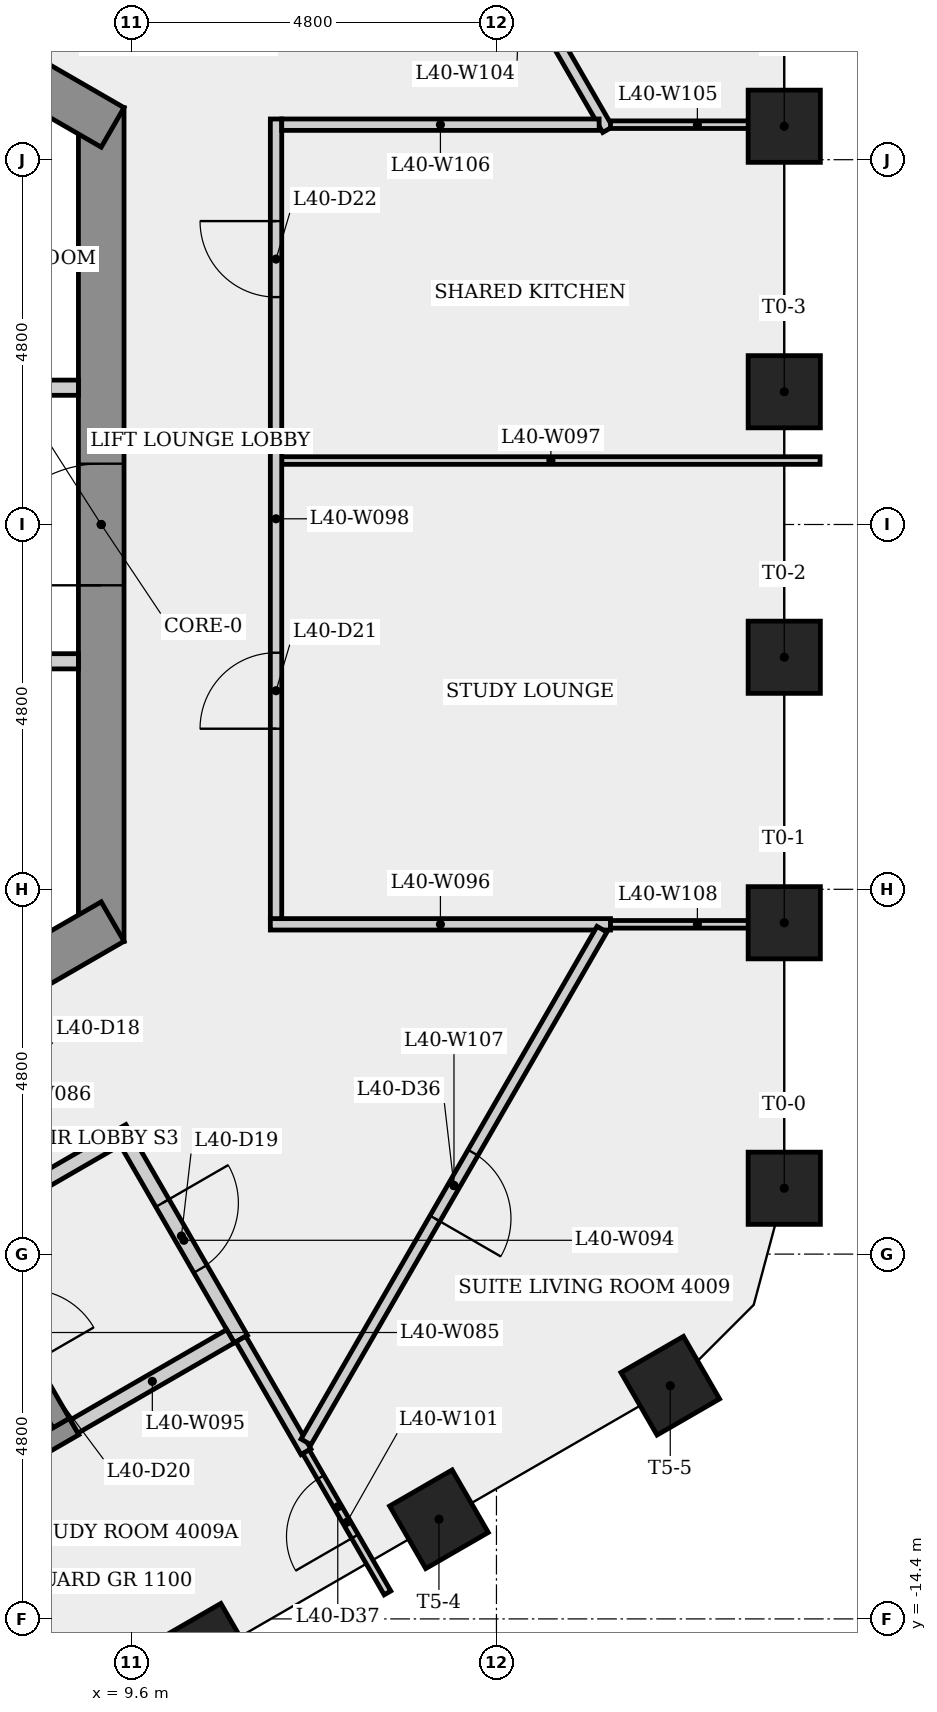
"""IFC4 building model, lengths in metres.
Left out: names, types, materials, properties, quantities, classifications, styles, units other than length and angle.
Written with IfcOpenShell. Run it as: python <this file> out.ifc"""

import sys

from ifc_helpers import new_model, si_unit, direction, frame, frame_2d, origin, origin_2d, place, context, subcontext, project, spatial, rectangle, extrude, element, fill, save


model = new_model("IFC4")
c1 = context("Model", 3, precision=1e-05, world=origin(), true_north=direction((0.0, 1.0)))
c2 = subcontext(c1, "Body", "Model", "MODEL_VIEW")
j1 = project(units=[si_unit("LENGTHUNIT", "METRE"), si_unit("PLANEANGLEUNIT", "RADIAN")], contexts=[c1])
p1 = place(None, origin())
s1 = spatial("IfcSite", under=j1, at=p1, CompositionType="ELEMENT")
p2 = place(p1, origin())
s2 = spatial("IfcBuilding", under=s1, at=p2, CompositionType="ELEMENT")
p3 = place(p2, frame((0.0, 0.0, 152.7)))
s3 = spatial("IfcBuildingStorey", under=s2, at=p3, CompositionType="ELEMENT", Elevation=152.7)
p4 = place(p3, frame((9.2, -5.485, 0.0), z_axis=(0.0, 0.0, 1.0), x_axis=(0.0, 1.0, 0.0)))
e1 = element("IfcWall", 1, at=p4, inside=s3, PredefinedType="SHEAR", context=c2, shape_type="SweptSolid", body=[
    extrude(rectangle(XDim=10.97, YDim=0.6, at=frame_2d((5.485, 0.0))), origin(), (0.0, 0.0, 1.0), 3.4),
])
p5 = place(p4, frame((4.685, 0.0, 0.0)))
e2 = element("IfcOpeningElement", 2, at=p5, cuts=e1, PredefinedType="OPENING", context=c2, shape_type="SweptSolid", body=[
    extrude(rectangle(XDim=1.6, YDim=2.1, at=frame_2d((0.8, 1.05))), frame((0.0, 0.31, 0.0), z_axis=(0.0, -1.0, 0.0), x_axis=(1.0, 0.0, 0.0)), (0.0, 0.0, 1.0), 0.62),
])
p6 = place(p3, frame((9.35, 5.225, 0.0), z_axis=(0.0, 0.0, 1.0), x_axis=(-0.866023993627, 0.500002442456, 0.0)))
e3 = element("IfcWall", 3, at=p6, inside=s3, PredefinedType="SHEAR", context=c2, shape_type="SweptSolid", body=[
    extrude(rectangle(XDim=10.97, YDim=0.6, at=frame_2d((5.485, 0.0))), origin(), (0.0, 0.0, 1.0), 3.4),
])
p7 = place(p6, frame((7.518, 0.0, 0.0)))
e4 = element("IfcOpeningElement", 4, at=p7, cuts=e3, PredefinedType="OPENING", context=c2, shape_type="SweptSolid", body=[
    extrude(rectangle(XDim=0.9, YDim=2.1, at=frame_2d((0.45, 1.05))), frame((0.0, 0.31, 0.0), z_axis=(0.0, -1.0, 0.0), x_axis=(1.0, 0.0, 0.0)), (0.0, 0.0, 1.0), 0.62),
])
p8 = place(p6, frame((1.172, 0.0, 0.0)))
e5 = element("IfcOpeningElement", 5, at=p8, cuts=e3, PredefinedType="OPENING", context=c2, shape_type="SweptSolid", body=[
    extrude(rectangle(XDim=0.9, YDim=2.1, at=frame_2d((0.45, 1.05))), frame((0.0, 0.31, 0.0), z_axis=(0.0, -1.0, 0.0), x_axis=(1.0, 0.0, 0.0)), (0.0, 0.0, 1.0), 0.62),
])
p9 = place(p3, frame((-0.15, -10.71, 0.0), z_axis=(0.0, 0.0, 1.0), x_axis=(0.866023993627, 0.500002442456, 0.0)))
e6 = element("IfcWall", 6, at=p9, inside=s3, PredefinedType="SHEAR", context=c2, shape_type="SweptSolid", body=[
    extrude(rectangle(XDim=10.97, YDim=0.6, at=frame_2d((5.485, 0.0))), origin(), (0.0, 0.0, 1.0), 3.4),
])
p10 = place(p9, frame((0.9, 0.0, 0.0)))
e7 = element("IfcOpeningElement", 7, at=p10, cuts=e6, PredefinedType="OPENING", context=c2, shape_type="SweptSolid", body=[
    extrude(rectangle(XDim=0.9, YDim=2.1, at=frame_2d((0.45, 1.05))), frame((0.0, 0.31, 0.0), z_axis=(0.0, -1.0, 0.0), x_axis=(1.0, 0.0, 0.0)), (0.0, 0.0, 1.0), 0.62),
])
p11 = place(p9, frame((7.512, 0.0, 0.0)))
e8 = element("IfcOpeningElement", 8, at=p11, cuts=e6, PredefinedType="OPENING", context=c2, shape_type="SweptSolid", body=[
    extrude(rectangle(XDim=0.9, YDim=2.1, at=frame_2d((0.45, 1.05))), frame((0.0, 0.31, 0.0), z_axis=(0.0, -1.0, 0.0), x_axis=(1.0, 0.0, 0.0)), (0.0, 0.0, 1.0), 0.62),
])
for number, where, z_axis, x_axis in (
    (9, (18.187, -8.734, 0.0), (0.0, 0.0, 1.0), (1.0, 0.0, 0.0)),
    (10, (18.187, -5.24, 0.0), (0.0, 0.0, 1.0), (1.0, 0.0, 0.0)),
    (11, (18.187, -1.747, 0.0), (0.0, 0.0, 1.0), (1.0, 0.0, 0.0)),
    (12, (18.187, 1.747, 0.0), (0.0, 0.0, 1.0), (1.0, 0.0, 0.0)),
    (13, (18.187, 5.24, 0.0), (0.0, 0.0, 1.0), (1.0, 0.0, 0.0)),
    (14, (10.6, -14.846, 0.0), (0.0, 0.0, 1.0), (0.5, -0.866, 0.0)),
    (15, (13.643, -13.089, 0.0), (0.0, 0.0, 1.0), (0.5, -0.866, 0.0)),
    (16, (16.687, -11.332, 0.0), (0.0, 0.0, 1.0), (0.5, -0.866, 0.0)),
):
    element("IfcColumn", number, at=place(p3, frame(where, z_axis=z_axis, x_axis=x_axis)), inside=s3, PredefinedType="COLUMN", context=c2, shape_type="SweptSolid", body=[
        extrude(rectangle(XDim=0.95, YDim=0.95, at=origin_2d()), origin(), (0.0, 0.0, 1.0), 3.4),
    ])
p12 = place(p3, frame((3.301, -15.068, 0.0), z_axis=(0.0, 0.0, 1.0), x_axis=(0.866035036182, 0.499983315828, 0.0)))
e17 = element("IfcWall", 17, at=p12, inside=s3, PredefinedType="SHEAR", context=c2, shape_type="SweptSolid", body=[
    extrude(rectangle(XDim=6.4, YDim=0.25, at=frame_2d((3.2, 0.0))), origin(), (0.0, 0.0, 1.0), 3.05),
])
p13 = place(p3, frame((7.153, -12.989, 0.0), z_axis=(0.0, 0.0, 1.0), x_axis=(0.500044099915, -0.86599994119, 0.0)))
e18 = element("IfcWall", 18, at=p13, inside=s3, PredefinedType="PARTITIONING", context=c2, shape_type="SweptSolid", body=[
    extrude(rectangle(XDim=3.833, YDim=0.1, at=frame_2d((1.917, 0.0))), origin(), (0.0, 0.0, 1.0), 3.05),
])
p14 = place(p3, frame((7.298, -9.441, 0.0), z_axis=(0.0, 0.0, 1.0), x_axis=(0.500034990121, -0.866005201286, 0.0)))
e19 = element("IfcWall", 19, at=p14, inside=s3, PredefinedType="SHEAR", context=c2, shape_type="SweptSolid", body=[
    extrude(rectangle(XDim=2.75, YDim=0.25, at=frame_2d((1.375, 0.0))), origin(), (0.0, 0.0, 1.0), 3.05),
])
p15 = place(p14, frame((0.875, 0.0, 0.0)))
e20 = element("IfcOpeningElement", 20, at=p15, cuts=e19, PredefinedType="OPENING", context=c2, shape_type="SweptSolid", body=[
    extrude(rectangle(XDim=1.0, YDim=2.1, at=frame_2d((0.5, 1.05))), frame((0.0, 0.135, 0.0), z_axis=(0.0, -1.0, 0.0), x_axis=(1.0, 0.0, 0.0)), (0.0, 0.0, 1.0), 0.27),
])
p16 = place(p3, frame((7.344, -9.27, 0.0), z_axis=(0.0, 0.0, 1.0), x_axis=(0.866005588531, 0.500034319456, 0.0)))
e21 = element("IfcWall", 21, at=p16, inside=s3, PredefinedType="PARTITIONING", context=c2, shape_type="SweptSolid", body=[
    extrude(rectangle(XDim=2.575, YDim=0.2, at=frame_2d((1.288, 0.0))), origin(), (0.0, 0.0, 1.0), 3.05),
])
for number, where, z_axis, x_axis in (
    (22, (7.475, 1.8, 0.0), (0.0, 0.0, 1.0), (1.0, 0.0, 0.0)),
    (23, (8.9, -1.8, 0.0), (0.0, 0.0, 1.0), (-1.0, 0.0, 0.0)),
):
    element("IfcWall", number, at=place(p3, frame(where, z_axis=z_axis, x_axis=x_axis)), inside=s3, PredefinedType="PARTITIONING", context=c2, shape_type="SweptSolid", body=[
        extrude(rectangle(XDim=1.425, YDim=0.2, at=frame_2d((0.712, 0.0))), origin(), (0.0, 0.0, 1.0), 3.05),
    ])
p17 = place(p3, frame((9.537, -8.119, 0.0), z_axis=(0.0, 0.0, 1.0), x_axis=(0.499990139034, -0.866031096941, 0.0)))
e24 = element("IfcWall", 24, at=p17, inside=s3, PredefinedType="PARTITIONING", context=c2, shape_type="SweptSolid", body=[
    extrude(rectangle(XDim=3.0, YDim=0.2, at=frame_2d((1.5, 0.0))), origin(), (0.0, 0.0, 1.0), 3.05),
])
p18 = place(p17, frame((0.935, 0.0, 0.0)))
e25 = element("IfcOpeningElement", 25, at=p18, cuts=e24, PredefinedType="OPENING", context=c2, shape_type="SweptSolid", body=[
    extrude(rectangle(XDim=1.0, YDim=2.1, at=frame_2d((0.5, 1.05))), frame((0.0, 0.11, 0.0), z_axis=(0.0, -1.0, 0.0), x_axis=(1.0, 0.0, 0.0)), (0.0, 0.0, 1.0), 0.22),
])
p19 = place(p3, frame((10.901, -10.681, 0.0), z_axis=(0.0, 0.0, 1.0), x_axis=(-0.866007538022, -0.500030943131, 0.0)))
e26 = element("IfcWall", 26, at=p19, inside=s3, PredefinedType="PARTITIONING", context=c2, shape_type="SweptSolid", body=[
    extrude(rectangle(XDim=2.375, YDim=0.2, at=frame_2d((1.188, 0.0))), origin(), (0.0, 0.0, 1.0), 3.05),
])
p20 = place(p3, frame((11.425, -5.261, 0.0), z_axis=(0.0, 0.0, 1.0), x_axis=(1.0, 0.0, 0.0)))
e27 = element("IfcWall", 27, at=p20, inside=s3, PredefinedType="PARTITIONING", context=c2, shape_type="SweptSolid", body=[
    extrude(rectangle(XDim=4.476, YDim=0.15, at=frame_2d((2.238, 0.0))), origin(), (0.0, 0.0, 1.0), 3.05),
])
p21 = place(p3, frame((11.575, 0.842, 0.0), z_axis=(0.0, 0.0, 1.0), x_axis=(1.0, 0.0, 0.0)))
e28 = element("IfcWall", 28, at=p21, inside=s3, PredefinedType="PARTITIONING", context=c2, shape_type="SweptSolid", body=[
    extrude(rectangle(XDim=7.083, YDim=0.1, at=frame_2d((3.541, 0.0))), origin(), (0.0, 0.0, 1.0), 3.05),
])
p22 = place(p3, frame((11.5, -5.186, 0.0), z_axis=(0.0, 0.0, 1.0), x_axis=(0.0, 1.0, 0.0)))
e29 = element("IfcWall", 29, at=p22, inside=s3, PredefinedType="PARTITIONING", context=c2, shape_type="SweptSolid", body=[
    extrude(rectangle(XDim=10.521, YDim=0.15, at=frame_2d((5.261, 0.0))), origin(), (0.0, 0.0, 1.0), 3.05),
])
p23 = place(p22, frame((2.499, 0.0, 0.0)))
e30 = element("IfcOpeningElement", 30, at=p23, cuts=e29, PredefinedType="OPENING", context=c2, shape_type="SweptSolid", body=[
    extrude(rectangle(XDim=1.0, YDim=2.1, at=frame_2d((0.5, 1.05))), frame((0.0, 0.085, 0.0), z_axis=(0.0, -1.0, 0.0), x_axis=(1.0, 0.0, 0.0)), (0.0, 0.0, 1.0), 0.17),
])
p24 = place(p22, frame((8.178, 0.0, 0.0)))
e31 = element("IfcOpeningElement", 31, at=p24, cuts=e29, PredefinedType="OPENING", context=c2, shape_type="SweptSolid", body=[
    extrude(rectangle(XDim=1.0, YDim=2.1, at=frame_2d((0.5, 1.05))), frame((0.0, 0.085, 0.0), z_axis=(0.0, -1.0, 0.0), x_axis=(1.0, 0.0, 0.0)), (0.0, 0.0, 1.0), 0.17),
])
p25 = place(p3, frame((11.894, -12.201, 0.0), z_axis=(0.0, 0.0, 1.0), x_axis=(-0.499878701538, 0.866095424159, 0.0)))
e32 = element("IfcWall", 32, at=p25, inside=s3, PredefinedType="PARTITIONING", context=c2, shape_type="SweptSolid", body=[
    extrude(rectangle(XDim=1.713, YDim=0.15, at=frame_2d((0.857, 0.0))), origin(), (0.0, 0.0, 1.0), 3.05),
])
p26 = place(p3, frame((12.966, -14.058, 0.0), z_axis=(0.0, 0.0, 1.0), x_axis=(-0.500057540742, 0.865992180073, 0.0)))
e33 = element("IfcWall", 33, at=p26, inside=s3, PredefinedType="PARTITIONING", context=c2, shape_type="SweptSolid", body=[
    extrude(rectangle(XDim=2.144, YDim=0.1, at=frame_2d((1.072, 0.0))), origin(), (0.0, 0.0, 1.0), 3.05),
])
p27 = place(p26, frame((0.858, 0.0, 0.0)))
e34 = element("IfcOpeningElement", 34, at=p27, cuts=e33, PredefinedType="OPENING", context=c2, shape_type="SweptSolid", body=[
    extrude(rectangle(XDim=0.9, YDim=2.1, at=frame_2d((0.45, 1.05))), frame((0.0, 0.06, 0.0), z_axis=(0.0, -1.0, 0.0), x_axis=(1.0, 0.0, 0.0)), (0.0, 0.0, 1.0), 0.12),
])
p28 = place(p3, frame((13.563, 9.179, 0.0), z_axis=(0.0, 0.0, 1.0), x_axis=(0.499998129301, -0.86602648383, 0.0)))
e35 = element("IfcWall", 35, at=p28, inside=s3, PredefinedType="PARTITIONING", context=c2, shape_type="SweptSolid", body=[
    extrude(rectangle(XDim=4.6, YDim=0.15, at=frame_2d((2.3, 0.0))), origin(), (0.0, 0.0, 1.0), 3.05),
])
p29 = place(p28, frame((1.787, 0.0, 0.0)))
e36 = element("IfcOpeningElement", 36, at=p29, cuts=e35, PredefinedType="OPENING", context=c2, shape_type="SweptSolid", body=[
    extrude(rectangle(XDim=1.0, YDim=2.1, at=frame_2d((0.5, 1.05))), frame((0.0, 0.085, 0.0), z_axis=(0.0, -1.0, 0.0), x_axis=(1.0, 0.0, 0.0)), (0.0, 0.0, 1.0), 0.17),
])
p30 = place(p3, frame((15.901, 5.261, 0.0), z_axis=(0.0, 0.0, 1.0), x_axis=(1.0, 0.0, 0.0)))
e37 = element("IfcWall", 37, at=p30, inside=s3, PredefinedType="PARTITIONING", context=c2, shape_type="SweptSolid", body=[
    extrude(rectangle(XDim=2.286, YDim=0.1, at=frame_2d((1.143, 0.0))), origin(), (0.0, 0.0, 1.0), 3.05),
])
p31 = place(p3, frame((15.751, 5.261, 0.0), z_axis=(0.0, 0.0, 1.0), x_axis=(-1.0, 0.0, 0.0)))
e38 = element("IfcWall", 38, at=p31, inside=s3, PredefinedType="PARTITIONING", context=c2, shape_type="SweptSolid", body=[
    extrude(rectangle(XDim=4.176, YDim=0.15, at=frame_2d((2.088, 0.0))), origin(), (0.0, 0.0, 1.0), 3.05),
])
p32 = place(p3, frame((15.788, -5.326, 0.0), z_axis=(0.0, 0.0, 1.0), x_axis=(-0.500022727545, -0.866012281633, 0.0)))
e39 = element("IfcWall", 39, at=p32, inside=s3, PredefinedType="PARTITIONING", context=c2, shape_type="SweptSolid", body=[
    extrude(rectangle(XDim=7.789, YDim=0.15, at=frame_2d((3.895, 0.0))), origin(), (0.0, 0.0, 1.0), 3.05),
])
p33 = place(p32, frame((3.394, 0.0, 0.0)))
e40 = element("IfcOpeningElement", 40, at=p33, cuts=e39, PredefinedType="OPENING", context=c2, shape_type="SweptSolid", body=[
    extrude(rectangle(XDim=1.0, YDim=2.1, at=frame_2d((0.5, 1.05))), frame((0.0, 0.085, 0.0), z_axis=(0.0, -1.0, 0.0), x_axis=(1.0, 0.0, 0.0)), (0.0, 0.0, 1.0), 0.17),
])
p34 = place(p3, frame((18.187, -5.261, 0.0), z_axis=(0.0, 0.0, 1.0), x_axis=(-1.0, 0.0, 0.0)))
e41 = element("IfcWall", 41, at=p34, inside=s3, PredefinedType="PARTITIONING", context=c2, shape_type="SweptSolid", body=[
    extrude(rectangle(XDim=2.286, YDim=0.1, at=frame_2d((1.143, 0.0))), origin(), (0.0, 0.0, 1.0), 3.05),
])
p35 = place(p18, origin())
e42 = element("IfcDoor", 42, at=p35, inside=s3, OperationType="SINGLE_SWING_LEFT", PredefinedType="DOOR", context=c2, shape_type="SweptSolid", body=[
    extrude(rectangle(XDim=1.0, YDim=2.1, at=frame_2d((0.5, 1.05))), frame((0.0, 0.025, 0.0), z_axis=(0.0, -1.0, 0.0), x_axis=(1.0, 0.0, 0.0)), (0.0, 0.0, 1.0), 0.05),
])
fill(e25, e42)
p36 = place(p23, origin())
e43 = element("IfcDoor", 43, at=p36, inside=s3, OperationType="SINGLE_SWING_LEFT", PredefinedType="DOOR", context=c2, shape_type="SweptSolid", body=[
    extrude(rectangle(XDim=1.0, YDim=2.1, at=frame_2d((0.5, 1.05))), frame((0.0, 0.025, 0.0), z_axis=(0.0, -1.0, 0.0), x_axis=(1.0, 0.0, 0.0)), (0.0, 0.0, 1.0), 0.05),
])
fill(e30, e43)
p37 = place(p24, origin())
e44 = element("IfcDoor", 44, at=p37, inside=s3, OperationType="SINGLE_SWING_RIGHT", PredefinedType="DOOR", context=c2, shape_type="SweptSolid", body=[
    extrude(rectangle(XDim=1.0, YDim=2.1, at=frame_2d((0.5, 1.05))), frame((0.0, 0.025, 0.0), z_axis=(0.0, -1.0, 0.0), x_axis=(1.0, 0.0, 0.0)), (0.0, 0.0, 1.0), 0.05),
])
fill(e31, e44)
p38 = place(p33, origin())
e45 = element("IfcDoor", 45, at=p38, inside=s3, OperationType="SINGLE_SWING_RIGHT", PredefinedType="DOOR", context=c2, shape_type="SweptSolid", body=[
    extrude(rectangle(XDim=1.0, YDim=2.1, at=frame_2d((0.5, 1.05))), frame((0.0, 0.025, 0.0), z_axis=(0.0, -1.0, 0.0), x_axis=(1.0, 0.0, 0.0)), (0.0, 0.0, 1.0), 0.05),
])
fill(e40, e45)
p39 = place(p27, origin())
e46 = element("IfcDoor", 46, at=p39, inside=s3, OperationType="SINGLE_SWING_LEFT", PredefinedType="DOOR", context=c2, shape_type="SweptSolid", body=[
    extrude(rectangle(XDim=0.9, YDim=2.1, at=frame_2d((0.45, 1.05))), frame((0.0, 0.025, 0.0), z_axis=(0.0, -1.0, 0.0), x_axis=(1.0, 0.0, 0.0)), (0.0, 0.0, 1.0), 0.05),
])
fill(e34, e46)
p40 = place(p5, origin())
e47 = element("IfcDoor", 47, at=p40, inside=s3, OperationType="SINGLE_SWING_LEFT", PredefinedType="DOOR", context=c2, shape_type="SweptSolid", body=[
    extrude(rectangle(XDim=1.6, YDim=2.1, at=frame_2d((0.8, 1.05))), frame((0.0, 0.025, 0.0), z_axis=(0.0, -1.0, 0.0), x_axis=(1.0, 0.0, 0.0)), (0.0, 0.0, 1.0), 0.05),
])
fill(e2, e47)
save(model, sys.argv[1])
